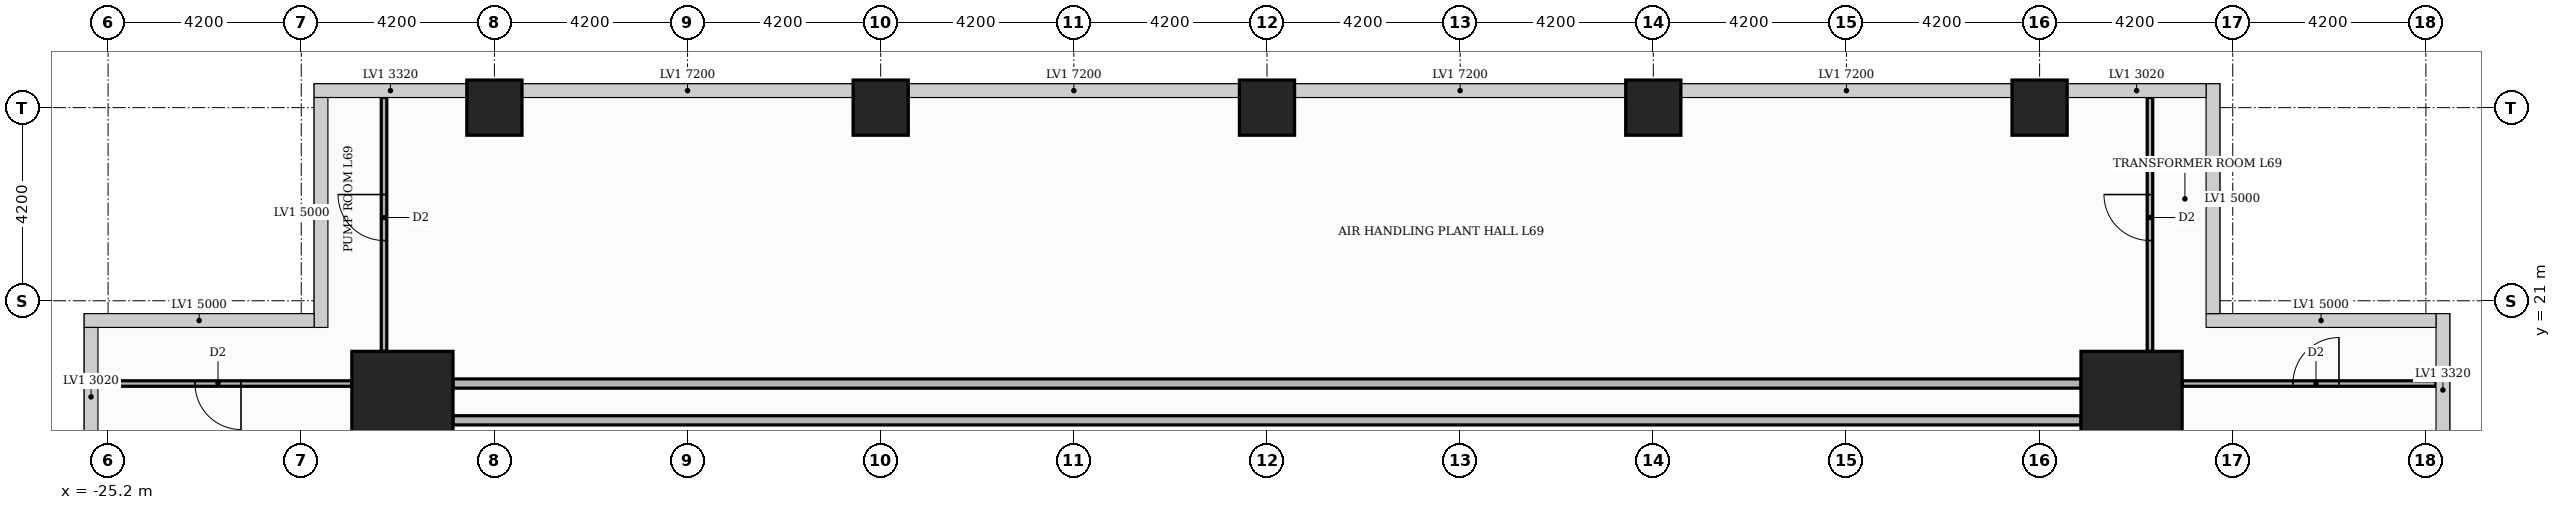
"""IFC4 building model, lengths in metres.
Left out: names, types, materials, properties, quantities, classifications, styles, units other than length and angle.
Written with IfcOpenShell. Run it as: python <this file> out.ifc"""

import sys

from ifc_helpers import new_model, si_unit, direction, frame, frame_2d, origin, origin_2d, place, context, subcontext, project, spatial, rectangle, extrude, element, fill, save


model = new_model("IFC4")
c1 = context("Model", 3, precision=1e-05, world=origin(), true_north=direction((0.0, 1.0)))
c2 = subcontext(c1, "Body", "Model", "MODEL_VIEW")
j1 = project(units=[si_unit("LENGTHUNIT", "METRE"), si_unit("PLANEANGLEUNIT", "RADIAN")], contexts=[c1])
p1 = place(None, origin())
s1 = spatial("IfcSite", under=j1, at=p1, CompositionType="ELEMENT")
p2 = place(p1, origin())
s2 = spatial("IfcBuilding", under=s1, at=p2, CompositionType="ELEMENT")
p3 = place(p2, frame((0.0, 0.0, 287.4)))
s3 = spatial("IfcBuildingStorey", under=s2, at=p3, CompositionType="ELEMENT", Elevation=287.4)
for number, where, z_axis, x_axis in (
    (1, (18.8, 18.8, 0.0), (0.0, 0.0, 1.0), (1.0, 0.0, 0.0)),
    (2, (-18.8, 18.8, 0.0), (0.0, 0.0, 1.0), (1.0, 0.0, 0.0)),
):
    element("IfcColumn", number, at=place(p3, frame(where, z_axis=z_axis, x_axis=x_axis)), inside=s3, PredefinedType="COLUMN", context=c2, shape_type="SweptSolid", body=[
        extrude(rectangle(XDim=2.2, YDim=2.2, at=origin_2d()), origin(), (0.0, 0.0, 1.0), 5.4),
    ])
for number, where, z_axis, x_axis in (
    (3, (0.0, 25.2, 0.0), (0.0, 0.0, 1.0), (1.0, 0.0, 0.0)),
    (4, (-8.4, 25.2, 0.0), (0.0, 0.0, 1.0), (1.0, 0.0, 0.0)),
    (5, (-16.8, 25.2, 0.0), (0.0, 0.0, 1.0), (1.0, 0.0, 0.0)),
    (6, (8.4, 25.2, 0.0), (0.0, 0.0, 1.0), (1.0, 0.0, 0.0)),
    (7, (16.8, 25.2, 0.0), (0.0, 0.0, 1.0), (1.0, 0.0, 0.0)),
):
    element("IfcColumn", number, at=place(p3, frame(where, z_axis=z_axis, x_axis=x_axis)), inside=s3, PredefinedType="COLUMN", context=c2, shape_type="SweptSolid", body=[
        extrude(rectangle(XDim=1.2, YDim=1.2, at=origin_2d()), origin(), (0.0, 0.0, 1.0), 5.4),
    ])
p4 = place(p3, frame((-17.7, 18.4, 0.0), z_axis=(0.0, 0.0, 1.0), x_axis=(1.0, 0.0, 0.0)))
e8 = element("IfcWall", 8, at=p4, inside=s3, PredefinedType="PARTITIONING", context=c2, shape_type="SweptSolid", body=[
    extrude(rectangle(XDim=35.4, YDim=0.2, at=frame_2d((17.7, 0.0))), origin(), (0.0, 0.0, 1.0), 5.05),
])
p5 = place(p3, frame((-25.42, 19.2, 0.0), z_axis=(0.0, 0.0, 1.0), x_axis=(1.0, 0.0, 0.0)))
e9 = element("IfcWall", 9, at=p5, inside=s3, PredefinedType="PARTITIONING", context=c2, shape_type="SweptSolid", body=[
    extrude(rectangle(XDim=5.52, YDim=0.12, at=frame_2d((2.76, 0.0))), origin(), (0.0, 0.0, 1.0), 5.05),
])
p6 = place(p5, frame((2.11, 0.0, 0.0)))
e10 = element("IfcOpeningElement", 10, at=p6, cuts=e9, PredefinedType="OPENING", context=c2, shape_type="SweptSolid", body=[
    extrude(rectangle(XDim=1.0, YDim=2.1, at=frame_2d((0.5, 1.05))), frame((0.0, 0.07, 0.0), z_axis=(0.0, -1.0, 0.0), x_axis=(1.0, 0.0, 0.0)), (0.0, 0.0, 1.0), 0.14),
])
p7 = place(p3, frame((-17.7, 19.2, 0.0), z_axis=(0.0, 0.0, 1.0), x_axis=(1.0, 0.0, 0.0)))
e11 = element("IfcWall", 11, at=p7, inside=s3, PredefinedType="PARTITIONING", context=c2, shape_type="SweptSolid", body=[
    extrude(rectangle(XDim=35.4, YDim=0.2, at=frame_2d((17.7, 0.0))), origin(), (0.0, 0.0, 1.0), 5.05),
])
p8 = place(p3, frame((19.9, 19.2, 0.0), z_axis=(0.0, 0.0, 1.0), x_axis=(1.0, 0.0, 0.0)))
e12 = element("IfcWall", 12, at=p8, inside=s3, PredefinedType="PARTITIONING", context=c2, shape_type="SweptSolid", body=[
    extrude(rectangle(XDim=5.52, YDim=0.12, at=frame_2d((2.76, 0.0))), origin(), (0.0, 0.0, 1.0), 5.05),
])
p9 = place(p8, frame((2.41, 0.0, 0.0)))
e13 = element("IfcOpeningElement", 13, at=p9, cuts=e12, PredefinedType="OPENING", context=c2, shape_type="SweptSolid", body=[
    extrude(rectangle(XDim=1.0, YDim=2.1, at=frame_2d((0.5, 1.05))), frame((0.0, 0.07, 0.0), z_axis=(0.0, -1.0, 0.0), x_axis=(1.0, 0.0, 0.0)), (0.0, 0.0, 1.0), 0.14),
])
p10 = place(p3, frame((-19.2, 19.9, 0.0), z_axis=(0.0, 0.0, 1.0), x_axis=(0.0, 1.0, 0.0)))
e14 = element("IfcWall", 14, at=p10, inside=s3, PredefinedType="PARTITIONING", context=c2, shape_type="SweptSolid", body=[
    extrude(rectangle(XDim=5.52, YDim=0.12, at=frame_2d((2.76, 0.0))), origin(), (0.0, 0.0, 1.0), 5.05),
])
p11 = place(p10, frame((2.41, 0.0, 0.0)))
e15 = element("IfcOpeningElement", 15, at=p11, cuts=e14, PredefinedType="OPENING", context=c2, shape_type="SweptSolid", body=[
    extrude(rectangle(XDim=1.0, YDim=2.1, at=frame_2d((0.5, 1.05))), frame((0.0, 0.07, 0.0), z_axis=(0.0, -1.0, 0.0), x_axis=(1.0, 0.0, 0.0)), (0.0, 0.0, 1.0), 0.14),
])
p12 = place(p3, frame((19.2, 19.9, 0.0), z_axis=(0.0, 0.0, 1.0), x_axis=(0.0, 1.0, 0.0)))
e16 = element("IfcWall", 16, at=p12, inside=s3, PredefinedType="PARTITIONING", context=c2, shape_type="SweptSolid", body=[
    extrude(rectangle(XDim=5.52, YDim=0.12, at=frame_2d((2.76, 0.0))), origin(), (0.0, 0.0, 1.0), 5.05),
])
p13 = place(p12, frame((2.41, 0.0, 0.0)))
e17 = element("IfcOpeningElement", 17, at=p13, cuts=e16, PredefinedType="OPENING", context=c2, shape_type="SweptSolid", body=[
    extrude(rectangle(XDim=1.0, YDim=2.1, at=frame_2d((0.5, 1.05))), frame((0.0, 0.07, 0.0), z_axis=(0.0, -1.0, 0.0), x_axis=(1.0, 0.0, 0.0)), (0.0, 0.0, 1.0), 0.14),
])
p14 = place(p9, origin())
e18 = element("IfcDoor", 18, at=p14, inside=s3, OperationType="SINGLE_SWING_RIGHT", PredefinedType="DOOR", context=c2, shape_type="SweptSolid", body=[
    extrude(rectangle(XDim=1.0, YDim=2.1, at=frame_2d((0.5, 1.05))), frame((0.0, 0.025, 0.0), z_axis=(0.0, -1.0, 0.0), x_axis=(1.0, 0.0, 0.0)), (0.0, 0.0, 1.0), 0.05),
])
fill(e13, e18)
p15 = place(p13, origin())
e19 = element("IfcDoor", 19, at=p15, inside=s3, OperationType="SINGLE_SWING_RIGHT", PredefinedType="DOOR", context=c2, shape_type="SweptSolid", body=[
    extrude(rectangle(XDim=1.0, YDim=2.1, at=frame_2d((0.5, 1.05))), frame((0.0, 0.025, 0.0), z_axis=(0.0, -1.0, 0.0), x_axis=(1.0, 0.0, 0.0)), (0.0, 0.0, 1.0), 0.05),
])
fill(e17, e19)
p16 = place(p11, origin())
e20 = element("IfcDoor", 20, at=p16, inside=s3, OperationType="SINGLE_SWING_RIGHT", PredefinedType="DOOR", context=c2, shape_type="SweptSolid", body=[
    extrude(rectangle(XDim=1.0, YDim=2.1, at=frame_2d((0.5, 1.05))), frame((0.0, 0.025, 0.0), z_axis=(0.0, -1.0, 0.0), x_axis=(1.0, 0.0, 0.0)), (0.0, 0.0, 1.0), 0.05),
])
fill(e15, e20)
p17 = place(p6, frame((1.0, 0.0, 0.0), z_axis=(0.0, 0.0, 1.0), x_axis=(-1.0, 0.0, 0.0)))
e21 = element("IfcDoor", 21, at=p17, inside=s3, OperationType="SINGLE_SWING_RIGHT", PredefinedType="DOOR", context=c2, shape_type="SweptSolid", body=[
    extrude(rectangle(XDim=1.0, YDim=2.1, at=frame_2d((0.5, 1.05))), frame((0.0, 0.025, 0.0), z_axis=(0.0, -1.0, 0.0), x_axis=(1.0, 0.0, 0.0)), (0.0, 0.0, 1.0), 0.05),
])
fill(e10, e21)
save(model, sys.argv[1])
